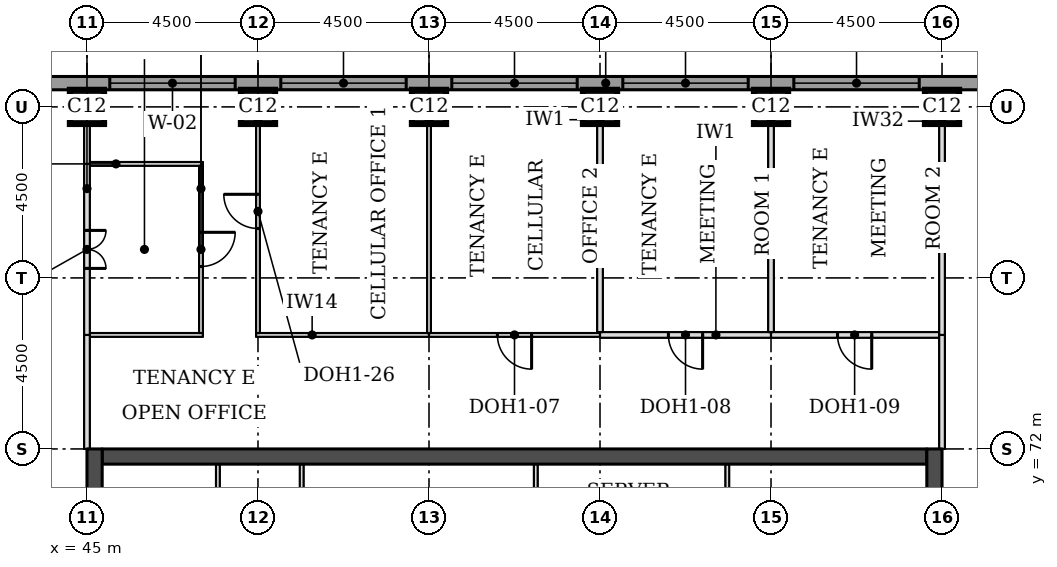
"""IFC4 building model, lengths in metres.
Left out: names, types, materials, properties, quantities, classifications, styles, units other than length and angle.
Written with IfcOpenShell. Run it as: python <this file> out.ifc"""

import sys

from ifc_helpers import new_model, si_unit, direction, frame, frame_2d, origin, origin_2d, place, context, subcontext, project, spatial, rectangle, extrude, element, fill, save


model = new_model("IFC4")
c1 = context("Model", 3, precision=1e-05, world=origin(), true_north=direction((0.0, 1.0)))
c2 = subcontext(c1, "Body", "Model", "MODEL_VIEW")
j1 = project(units=[si_unit("LENGTHUNIT", "METRE"), si_unit("PLANEANGLEUNIT", "RADIAN")], contexts=[c1])
p1 = place(None, origin())
s1 = spatial("IfcSite", under=j1, at=p1, CompositionType="ELEMENT")
p2 = place(p1, origin())
s2 = spatial("IfcBuilding", under=s1, at=p2, CompositionType="ELEMENT")
p3 = place(p2, frame((0.0, 0.0, 147.7)))
s3 = spatial("IfcBuildingStorey", under=s2, at=p3, CompositionType="ELEMENT", Elevation=147.7)
for number, where, z_axis, x_axis in (
    (1, (45.0, 81.0, 0.0), (0.0, 0.0, 1.0), (1.0, 0.0, 0.0)),
    (2, (49.5, 81.0, 0.0), (0.0, 0.0, 1.0), (1.0, 0.0, 0.0)),
    (3, (54.0, 81.0, 0.0), (0.0, 0.0, 1.0), (1.0, 0.0, 0.0)),
    (4, (58.5, 81.0, 0.0), (0.0, 0.0, 1.0), (1.0, 0.0, 0.0)),
    (5, (63.0, 81.0, 0.0), (0.0, 0.0, 1.0), (1.0, 0.0, 0.0)),
    (6, (67.5, 81.0, 0.0), (0.0, 0.0, 1.0), (1.0, 0.0, 0.0)),
):
    element("IfcColumn", number, at=place(p3, frame(where, z_axis=z_axis, x_axis=x_axis)), inside=s3, PredefinedType="COLUMN", context=c2, shape_type="SweptSolid", body=[
        extrude(rectangle(XDim=0.9, YDim=0.9, at=origin_2d()), origin(), (0.0, 0.0, 1.0), 3.7),
    ])
p4 = place(p3, frame((45.4, 71.8, 0.0), z_axis=(0.0, 0.0, 1.0), x_axis=(1.0, 0.0, 0.0)))
e7 = element("IfcWall", 7, at=p4, inside=s3, PredefinedType="SHEAR", context=c2, shape_type="SweptSolid", body=[
    extrude(rectangle(XDim=21.7, YDim=0.4, at=frame_2d((10.85, 0.0))), origin(), (0.0, 0.0, 1.0), 3.7),
])
p5 = place(p3, frame((45.2, 49.5, 0.0), z_axis=(0.0, 0.0, 1.0), x_axis=(0.0, 1.0, 0.0)))
e8 = element("IfcWall", 8, at=p5, inside=s3, PredefinedType="SHEAR", context=c2, shape_type="SweptSolid", body=[
    extrude(rectangle(XDim=22.5, YDim=0.4, at=frame_2d((11.25, 0.0))), origin(), (0.0, 0.0, 1.0), 3.7),
])
p6 = place(p5, frame((4.2, 0.0, 0.0)))
e9 = element("IfcOpeningElement", 9, at=p6, cuts=e8, PredefinedType="OPENING", context=c2, shape_type="SweptSolid", body=[
    extrude(rectangle(XDim=1.8, YDim=2.1, at=frame_2d((0.9, 1.05))), frame((0.0, 0.21, 0.0), z_axis=(0.0, -1.0, 0.0), x_axis=(1.0, 0.0, 0.0)), (0.0, 0.0, 1.0), 0.42),
])
p7 = place(p5, frame((6.9, 0.0, 0.0)))
e10 = element("IfcOpeningElement", 10, at=p7, cuts=e8, PredefinedType="OPENING", context=c2, shape_type="SweptSolid", body=[
    extrude(rectangle(XDim=1.1, YDim=2.1, at=frame_2d((0.55, 1.05))), frame((0.0, 0.21, 0.0), z_axis=(0.0, -1.0, 0.0), x_axis=(1.0, 0.0, 0.0)), (0.0, 0.0, 1.0), 0.42),
])
p8 = place(p5, frame((13.6, 0.0, 0.0)))
e11 = element("IfcOpeningElement", 11, at=p8, cuts=e8, PredefinedType="OPENING", context=c2, shape_type="SweptSolid", body=[
    extrude(rectangle(XDim=1.1, YDim=2.1, at=frame_2d((0.55, 1.05))), frame((0.0, 0.21, 0.0), z_axis=(0.0, -1.0, 0.0), x_axis=(1.0, 0.0, 0.0)), (0.0, 0.0, 1.0), 0.42),
])
p9 = place(p5, frame((16.5, 0.0, 0.0)))
e12 = element("IfcOpeningElement", 12, at=p9, cuts=e8, PredefinedType="OPENING", context=c2, shape_type="SweptSolid", body=[
    extrude(rectangle(XDim=1.8, YDim=2.1, at=frame_2d((0.9, 1.05))), frame((0.0, 0.21, 0.0), z_axis=(0.0, -1.0, 0.0), x_axis=(1.0, 0.0, 0.0)), (0.0, 0.0, 1.0), 0.42),
])
p10 = place(p3, frame((67.3, 49.5, 0.0), z_axis=(0.0, 0.0, 1.0), x_axis=(0.0, 1.0, 0.0)))
e13 = element("IfcWall", 13, at=p10, inside=s3, PredefinedType="SHEAR", context=c2, shape_type="SweptSolid", body=[
    extrude(rectangle(XDim=22.5, YDim=0.4, at=frame_2d((11.25, 0.0))), origin(), (0.0, 0.0, 1.0), 3.7),
])
p11 = place(p10, frame((4.2, 0.0, 0.0)))
e14 = element("IfcOpeningElement", 14, at=p11, cuts=e13, PredefinedType="OPENING", context=c2, shape_type="SweptSolid", body=[
    extrude(rectangle(XDim=1.8, YDim=2.1, at=frame_2d((0.9, 1.05))), frame((0.0, 0.21, 0.0), z_axis=(0.0, -1.0, 0.0), x_axis=(1.0, 0.0, 0.0)), (0.0, 0.0, 1.0), 0.42),
])
p12 = place(p10, frame((6.9, 0.0, 0.0)))
e15 = element("IfcOpeningElement", 15, at=p12, cuts=e13, PredefinedType="OPENING", context=c2, shape_type="SweptSolid", body=[
    extrude(rectangle(XDim=1.1, YDim=2.1, at=frame_2d((0.55, 1.05))), frame((0.0, 0.21, 0.0), z_axis=(0.0, -1.0, 0.0), x_axis=(1.0, 0.0, 0.0)), (0.0, 0.0, 1.0), 0.42),
])
p13 = place(p10, frame((13.6, 0.0, 0.0)))
e16 = element("IfcOpeningElement", 16, at=p13, cuts=e13, PredefinedType="OPENING", context=c2, shape_type="SweptSolid", body=[
    extrude(rectangle(XDim=1.1, YDim=2.1, at=frame_2d((0.55, 1.05))), frame((0.0, 0.21, 0.0), z_axis=(0.0, -1.0, 0.0), x_axis=(1.0, 0.0, 0.0)), (0.0, 0.0, 1.0), 0.42),
])
p14 = place(p10, frame((16.5, 0.0, 0.0)))
e17 = element("IfcOpeningElement", 17, at=p14, cuts=e13, PredefinedType="OPENING", context=c2, shape_type="SweptSolid", body=[
    extrude(rectangle(XDim=1.8, YDim=2.1, at=frame_2d((0.9, 1.05))), frame((0.0, 0.21, 0.0), z_axis=(0.0, -1.0, 0.0), x_axis=(1.0, 0.0, 0.0)), (0.0, 0.0, 1.0), 0.42),
])
p15 = place(p3, frame((72.331, 81.625, 0.0), z_axis=(0.0, 0.0, 1.0), x_axis=(-1.0, 0.0, 0.0)))
e18 = element("IfcWall", 18, at=p15, inside=s3, PredefinedType="STANDARD", context=c2, shape_type="SweptSolid", body=[
    extrude(rectangle(XDim=32.163, YDim=0.35, at=frame_2d((16.081, 0.0))), origin(), (0.0, 0.0, 1.0), 3.525),
])
p16 = place(p15, frame((5.431, 0.0, 0.9)))
e19 = element("IfcOpeningElement", 19, at=p16, cuts=e18, PredefinedType="OPENING", context=c2, shape_type="SweptSolid", body=[
    extrude(rectangle(XDim=3.3, YDim=1.9, at=frame_2d((1.65, 0.95))), frame((0.0, 0.185, 0.0), z_axis=(0.0, -1.0, 0.0), x_axis=(1.0, 0.0, 0.0)), (0.0, 0.0, 1.0), 0.37),
])
p17 = place(p15, frame((9.931, 0.0, 0.9)))
e20 = element("IfcOpeningElement", 20, at=p17, cuts=e18, PredefinedType="OPENING", context=c2, shape_type="SweptSolid", body=[
    extrude(rectangle(XDim=3.3, YDim=1.9, at=frame_2d((1.65, 0.95))), frame((0.0, 0.185, 0.0), z_axis=(0.0, -1.0, 0.0), x_axis=(1.0, 0.0, 0.0)), (0.0, 0.0, 1.0), 0.37),
])
p18 = place(p15, frame((14.431, 0.0, 0.9)))
e21 = element("IfcOpeningElement", 21, at=p18, cuts=e18, PredefinedType="OPENING", context=c2, shape_type="SweptSolid", body=[
    extrude(rectangle(XDim=3.3, YDim=1.9, at=frame_2d((1.65, 0.95))), frame((0.0, 0.185, 0.0), z_axis=(0.0, -1.0, 0.0), x_axis=(1.0, 0.0, 0.0)), (0.0, 0.0, 1.0), 0.37),
])
p19 = place(p15, frame((18.931, 0.0, 0.9)))
e22 = element("IfcOpeningElement", 22, at=p19, cuts=e18, PredefinedType="OPENING", context=c2, shape_type="SweptSolid", body=[
    extrude(rectangle(XDim=3.3, YDim=1.9, at=frame_2d((1.65, 0.95))), frame((0.0, 0.185, 0.0), z_axis=(0.0, -1.0, 0.0), x_axis=(1.0, 0.0, 0.0)), (0.0, 0.0, 1.0), 0.37),
])
p20 = place(p15, frame((23.431, 0.0, 0.9)))
e23 = element("IfcOpeningElement", 23, at=p20, cuts=e18, PredefinedType="OPENING", context=c2, shape_type="SweptSolid", body=[
    extrude(rectangle(XDim=3.3, YDim=1.9, at=frame_2d((1.65, 0.95))), frame((0.0, 0.185, 0.0), z_axis=(0.0, -1.0, 0.0), x_axis=(1.0, 0.0, 0.0)), (0.0, 0.0, 1.0), 0.37),
])
p21 = place(p3, frame((45.075, 75.0, 0.0), z_axis=(0.0, 0.0, 1.0), x_axis=(1.0, 0.0, 0.0)))
e24 = element("IfcWall", 24, at=p21, inside=s3, PredefinedType="PARTITIONING", context=c2, shape_type="SweptSolid", body=[
    extrude(rectangle(XDim=2.975, YDim=0.1, at=frame_2d((1.488, 0.0))), origin(), (0.0, 0.0, 1.0), 3.55),
])
p22 = place(p3, frame((49.45, 75.0, 0.0), z_axis=(0.0, 0.0, 1.0), x_axis=(1.0, 0.0, 0.0)))
e25 = element("IfcWall", 25, at=p22, inside=s3, PredefinedType="PARTITIONING", context=c2, shape_type="SweptSolid", body=[
    extrude(rectangle(XDim=4.55, YDim=0.1, at=frame_2d((2.275, 0.0))), origin(), (0.0, 0.0, 1.0), 3.55),
])
p23 = place(p3, frame((54.0, 75.0, 0.0), z_axis=(0.0, 0.0, 1.0), x_axis=(1.0, 0.0, 0.0)))
e26 = element("IfcWall", 26, at=p23, inside=s3, PredefinedType="PARTITIONING", context=c2, shape_type="SweptSolid", body=[
    extrude(rectangle(XDim=4.5, YDim=0.1, at=frame_2d((2.25, 0.0))), origin(), (0.0, 0.0, 1.0), 3.55),
])
p24 = place(p23, frame((1.8, 0.0, 0.0)))
e27 = element("IfcOpeningElement", 27, at=p24, cuts=e26, PredefinedType="OPENING", context=c2, shape_type="SweptSolid", body=[
    extrude(rectangle(XDim=0.9, YDim=2.1, at=frame_2d((0.45, 1.05))), frame((0.0, 0.06, 0.0), z_axis=(0.0, -1.0, 0.0), x_axis=(1.0, 0.0, 0.0)), (0.0, 0.0, 1.0), 0.12),
])
p25 = place(p3, frame((58.5, 75.0, 0.0), z_axis=(0.0, 0.0, 1.0), x_axis=(1.0, 0.0, 0.0)))
e28 = element("IfcWall", 28, at=p25, inside=s3, PredefinedType="PARTITIONING", context=c2, shape_type="SweptSolid", body=[
    extrude(rectangle(XDim=4.5, YDim=0.15, at=frame_2d((2.25, 0.0))), origin(), (0.0, 0.0, 1.0), 3.55),
])
p26 = place(p25, frame((1.8, 0.0, 0.0)))
e29 = element("IfcOpeningElement", 29, at=p26, cuts=e28, PredefinedType="OPENING", context=c2, shape_type="SweptSolid", body=[
    extrude(rectangle(XDim=0.9, YDim=2.1, at=frame_2d((0.45, 1.05))), frame((0.0, 0.085, 0.0), z_axis=(0.0, -1.0, 0.0), x_axis=(1.0, 0.0, 0.0)), (0.0, 0.0, 1.0), 0.17),
])
p27 = place(p3, frame((63.0, 75.0, 0.0), z_axis=(0.0, 0.0, 1.0), x_axis=(1.0, 0.0, 0.0)))
e30 = element("IfcWall", 30, at=p27, inside=s3, PredefinedType="PARTITIONING", context=c2, shape_type="SweptSolid", body=[
    extrude(rectangle(XDim=4.425, YDim=0.15, at=frame_2d((2.212, 0.0))), origin(), (0.0, 0.0, 1.0), 3.55),
])
p28 = place(p27, frame((1.75, 0.0, 0.0)))
e31 = element("IfcOpeningElement", 31, at=p28, cuts=e30, PredefinedType="OPENING", context=c2, shape_type="SweptSolid", body=[
    extrude(rectangle(XDim=0.9, YDim=2.1, at=frame_2d((0.45, 1.05))), frame((0.0, 0.085, 0.0), z_axis=(0.0, -1.0, 0.0), x_axis=(1.0, 0.0, 0.0)), (0.0, 0.0, 1.0), 0.17),
])
p29 = place(p3, frame((45.075, 79.5, 0.0), z_axis=(0.0, 0.0, 1.0), x_axis=(1.0, 0.0, 0.0)))
e32 = element("IfcWall", 32, at=p29, inside=s3, PredefinedType="PARTITIONING", context=c2, shape_type="SweptSolid", body=[
    extrude(rectangle(XDim=2.975, YDim=0.1, at=frame_2d((1.488, 0.0))), origin(), (0.0, 0.0, 1.0), 3.55),
])
for number, where, z_axis, x_axis in (
    (33, (45.0, 72.0, 0.0), (0.0, 0.0, 1.0), (0.0, 1.0, 0.0)),
    (34, (67.5, 72.0, 0.0), (0.0, 0.0, 1.0), (0.0, 1.0, 0.0)),
):
    element("IfcWall", number, at=place(p3, frame(where, z_axis=z_axis, x_axis=x_axis)), inside=s3, PredefinedType="PARTITIONING", context=c2, shape_type="SweptSolid", body=[
        extrude(rectangle(XDim=3.0, YDim=0.15, at=frame_2d((1.5, 0.0))), origin(), (0.0, 0.0, 1.0), 3.022),
    ])
p30 = place(p3, frame((45.0, 75.0, 0.0), z_axis=(0.0, 0.0, 1.0), x_axis=(0.0, 1.0, 0.0)))
e35 = element("IfcWall", 35, at=p30, inside=s3, PredefinedType="PARTITIONING", context=c2, shape_type="SweptSolid", body=[
    extrude(rectangle(XDim=4.5, YDim=0.15, at=frame_2d((2.25, 0.0))), origin(), (0.0, 0.0, 1.0), 3.022),
])
p31 = place(p30, frame((1.75, 0.0, 0.0)))
e36 = element("IfcOpeningElement", 36, at=p31, cuts=e35, PredefinedType="OPENING", context=c2, shape_type="SweptSolid", body=[
    extrude(rectangle(XDim=1.0, YDim=2.1, at=frame_2d((0.5, 1.05))), frame((0.0, 0.085, 0.0), z_axis=(0.0, -1.0, 0.0), x_axis=(1.0, 0.0, 0.0)), (0.0, 0.0, 1.0), 0.17),
])
p32 = place(p3, frame((67.5, 75.0, 0.0), z_axis=(0.0, 0.0, 1.0), x_axis=(0.0, 1.0, 0.0)))
e37 = element("IfcWall", 37, at=p32, inside=s3, PredefinedType="PARTITIONING", context=c2, shape_type="SweptSolid", body=[
    extrude(rectangle(XDim=6.45, YDim=0.15, at=frame_2d((3.225, 0.0))), origin(), (0.0, 0.0, 1.0), 3.022),
])
p33 = place(p3, frame((48.0, 75.05, 0.0), z_axis=(0.0, 0.0, 1.0), x_axis=(0.0, 1.0, 0.0)))
e38 = element("IfcWall", 38, at=p33, inside=s3, PredefinedType="PARTITIONING", context=c2, shape_type="SweptSolid", body=[
    extrude(rectangle(XDim=4.4, YDim=0.1, at=frame_2d((2.2, 0.0))), origin(), (0.0, 0.0, 1.0), 3.55),
])
p34 = place(p33, frame((1.75, 0.0, 0.0)))
e39 = element("IfcOpeningElement", 39, at=p34, cuts=e38, PredefinedType="OPENING", context=c2, shape_type="SweptSolid", body=[
    extrude(rectangle(XDim=0.9, YDim=2.1, at=frame_2d((0.45, 1.05))), frame((0.0, 0.06, 0.0), z_axis=(0.0, -1.0, 0.0), x_axis=(1.0, 0.0, 0.0)), (0.0, 0.0, 1.0), 0.12),
])
p35 = place(p3, frame((49.5, 75.05, 0.0), z_axis=(0.0, 0.0, 1.0), x_axis=(0.0, 1.0, 0.0)))
e40 = element("IfcWall", 40, at=p35, inside=s3, PredefinedType="PARTITIONING", context=c2, shape_type="SweptSolid", body=[
    extrude(rectangle(XDim=6.4, YDim=0.1, at=frame_2d((3.2, 0.0))), origin(), (0.0, 0.0, 1.0), 3.55),
])
p36 = place(p35, frame((2.75, 0.0, 0.0)))
e41 = element("IfcOpeningElement", 41, at=p36, cuts=e40, PredefinedType="OPENING", context=c2, shape_type="SweptSolid", body=[
    extrude(rectangle(XDim=0.9, YDim=2.1, at=frame_2d((0.45, 1.05))), frame((0.0, 0.06, 0.0), z_axis=(0.0, -1.0, 0.0), x_axis=(1.0, 0.0, 0.0)), (0.0, 0.0, 1.0), 0.12),
])
p37 = place(p3, frame((54.0, 75.05, 0.0), z_axis=(0.0, 0.0, 1.0), x_axis=(0.0, 1.0, 0.0)))
e42 = element("IfcWall", 42, at=p37, inside=s3, PredefinedType="PARTITIONING", context=c2, shape_type="SweptSolid", body=[
    extrude(rectangle(XDim=6.4, YDim=0.1, at=frame_2d((3.2, 0.0))), origin(), (0.0, 0.0, 1.0), 3.55),
])
for number, where, z_axis, x_axis in (
    (43, (58.5, 75.075, 0.0), (0.0, 0.0, 1.0), (0.0, 1.0, 0.0)),
    (44, (63.0, 75.075, 0.0), (0.0, 0.0, 1.0), (0.0, 1.0, 0.0)),
):
    element("IfcWall", number, at=place(p3, frame(where, z_axis=z_axis, x_axis=x_axis)), inside=s3, PredefinedType="PARTITIONING", context=c2, shape_type="SweptSolid", body=[
        extrude(rectangle(XDim=6.375, YDim=0.15, at=frame_2d((3.188, 0.0))), origin(), (0.0, 0.0, 1.0), 3.55),
    ])
p38 = place(p3, frame((45.0, 79.5, 0.0), z_axis=(0.0, 0.0, 1.0), x_axis=(0.0, 1.0, 0.0)))
e45 = element("IfcWall", 45, at=p38, inside=s3, PredefinedType="PARTITIONING", context=c2, shape_type="SweptSolid", body=[
    extrude(rectangle(XDim=1.95, YDim=0.15, at=frame_2d((0.975, 0.0))), origin(), (0.0, 0.0, 1.0), 3.022),
])
for number, where, z_axis, x_axis in (
    (46, (48.445, 68.5, 0.0), (0.0, 0.0, 1.0), (0.0, 1.0, 0.0)),
    (47, (50.65, 68.5, 0.0), (0.0, 0.0, 1.0), (0.0, 1.0, 0.0)),
    (48, (56.81, 68.5, 0.0), (0.0, 0.0, 1.0), (0.0, 1.0, 0.0)),
    (49, (61.85, 68.5, 0.0), (0.0, 0.0, 1.0), (0.0, 1.0, 0.0)),
):
    element("IfcWall", number, at=place(p3, frame(where, z_axis=z_axis, x_axis=x_axis)), inside=s3, PredefinedType="PARTITIONING", context=c2, shape_type="SweptSolid", body=[
        extrude(rectangle(XDim=3.1, YDim=0.1, at=frame_2d((1.55, 0.0))), origin(), (0.0, 0.0, 1.0), 3.55),
    ])
p39 = place(p16, origin())
e50 = element("IfcWindow", 50, at=p39, inside=s3, PartitioningType="SINGLE_PANEL", PredefinedType="WINDOW", context=c2, shape_type="SweptSolid", body=[
    extrude(rectangle(XDim=3.3, YDim=1.9, at=frame_2d((1.65, 0.95))), frame((0.0, 0.085, 0.0), z_axis=(0.0, -1.0, 0.0), x_axis=(1.0, 0.0, 0.0)), (0.0, 0.0, 1.0), 0.06),
])
fill(e19, e50)
p40 = place(p17, origin())
e51 = element("IfcWindow", 51, at=p40, inside=s3, PartitioningType="SINGLE_PANEL", PredefinedType="WINDOW", context=c2, shape_type="SweptSolid", body=[
    extrude(rectangle(XDim=3.3, YDim=1.9, at=frame_2d((1.65, 0.95))), frame((0.0, 0.085, 0.0), z_axis=(0.0, -1.0, 0.0), x_axis=(1.0, 0.0, 0.0)), (0.0, 0.0, 1.0), 0.06),
])
fill(e20, e51)
p41 = place(p18, origin())
e52 = element("IfcWindow", 52, at=p41, inside=s3, PartitioningType="SINGLE_PANEL", PredefinedType="WINDOW", context=c2, shape_type="SweptSolid", body=[
    extrude(rectangle(XDim=3.3, YDim=1.9, at=frame_2d((1.65, 0.95))), frame((0.0, 0.085, 0.0), z_axis=(0.0, -1.0, 0.0), x_axis=(1.0, 0.0, 0.0)), (0.0, 0.0, 1.0), 0.06),
])
fill(e21, e52)
p42 = place(p19, origin())
e53 = element("IfcWindow", 53, at=p42, inside=s3, PartitioningType="SINGLE_PANEL", PredefinedType="WINDOW", context=c2, shape_type="SweptSolid", body=[
    extrude(rectangle(XDim=3.3, YDim=1.9, at=frame_2d((1.65, 0.95))), frame((0.0, 0.085, 0.0), z_axis=(0.0, -1.0, 0.0), x_axis=(1.0, 0.0, 0.0)), (0.0, 0.0, 1.0), 0.06),
])
fill(e22, e53)
p43 = place(p20, origin())
e54 = element("IfcWindow", 54, at=p43, inside=s3, PartitioningType="SINGLE_PANEL", PredefinedType="WINDOW", context=c2, shape_type="SweptSolid", body=[
    extrude(rectangle(XDim=3.3, YDim=1.9, at=frame_2d((1.65, 0.95))), frame((0.0, 0.085, 0.0), z_axis=(0.0, -1.0, 0.0), x_axis=(1.0, 0.0, 0.0)), (0.0, 0.0, 1.0), 0.06),
])
fill(e23, e54)
p44 = place(p31, frame((1.0, 0.0, 0.0), z_axis=(0.0, 0.0, 1.0), x_axis=(-1.0, 0.0, 0.0)))
e55 = element("IfcDoor", 55, at=p44, inside=s3, OperationType="DOUBLE_DOOR_SINGLE_SWING", PredefinedType="DOOR", context=c2, shape_type="SweptSolid", body=[
    extrude(rectangle(XDim=1.0, YDim=2.1, at=frame_2d((0.5, 1.05))), frame((0.0, 0.025, 0.0), z_axis=(0.0, -1.0, 0.0), x_axis=(1.0, 0.0, 0.0)), (0.0, 0.0, 1.0), 0.05),
])
fill(e36, e55)
p45 = place(p34, frame((0.9, 0.0, 0.0), z_axis=(0.0, 0.0, 1.0), x_axis=(-1.0, 0.0, 0.0)))
e56 = element("IfcDoor", 56, at=p45, inside=s3, OperationType="SINGLE_SWING_LEFT", PredefinedType="DOOR", context=c2, shape_type="SweptSolid", body=[
    extrude(rectangle(XDim=0.9, YDim=2.1, at=frame_2d((0.45, 1.05))), frame((0.0, 0.025, 0.0), z_axis=(0.0, -1.0, 0.0), x_axis=(1.0, 0.0, 0.0)), (0.0, 0.0, 1.0), 0.05),
])
fill(e39, e56)
p46 = place(p36, origin())
e57 = element("IfcDoor", 57, at=p46, inside=s3, OperationType="SINGLE_SWING_RIGHT", PredefinedType="DOOR", context=c2, shape_type="SweptSolid", body=[
    extrude(rectangle(XDim=0.9, YDim=2.1, at=frame_2d((0.45, 1.05))), frame((0.0, 0.025, 0.0), z_axis=(0.0, -1.0, 0.0), x_axis=(1.0, 0.0, 0.0)), (0.0, 0.0, 1.0), 0.05),
])
fill(e41, e57)
p47 = place(p24, frame((0.9, 0.0, 0.0), z_axis=(0.0, 0.0, 1.0), x_axis=(-1.0, 0.0, 0.0)))
e58 = element("IfcDoor", 58, at=p47, inside=s3, OperationType="SINGLE_SWING_LEFT", PredefinedType="DOOR", context=c2, shape_type="SweptSolid", body=[
    extrude(rectangle(XDim=0.9, YDim=2.1, at=frame_2d((0.45, 1.05))), frame((0.0, 0.025, 0.0), z_axis=(0.0, -1.0, 0.0), x_axis=(1.0, 0.0, 0.0)), (0.0, 0.0, 1.0), 0.05),
])
fill(e27, e58)
p48 = place(p26, frame((0.9, 0.0, 0.0), z_axis=(0.0, 0.0, 1.0), x_axis=(-1.0, 0.0, 0.0)))
e59 = element("IfcDoor", 59, at=p48, inside=s3, OperationType="SINGLE_SWING_LEFT", PredefinedType="DOOR", context=c2, shape_type="SweptSolid", body=[
    extrude(rectangle(XDim=0.9, YDim=2.1, at=frame_2d((0.45, 1.05))), frame((0.0, 0.025, 0.0), z_axis=(0.0, -1.0, 0.0), x_axis=(1.0, 0.0, 0.0)), (0.0, 0.0, 1.0), 0.05),
])
fill(e29, e59)
p49 = place(p28, frame((0.9, 0.0, 0.0), z_axis=(0.0, 0.0, 1.0), x_axis=(-1.0, 0.0, 0.0)))
e60 = element("IfcDoor", 60, at=p49, inside=s3, OperationType="SINGLE_SWING_LEFT", PredefinedType="DOOR", context=c2, shape_type="SweptSolid", body=[
    extrude(rectangle(XDim=0.9, YDim=2.1, at=frame_2d((0.45, 1.05))), frame((0.0, 0.025, 0.0), z_axis=(0.0, -1.0, 0.0), x_axis=(1.0, 0.0, 0.0)), (0.0, 0.0, 1.0), 0.05),
])
fill(e31, e60)
save(model, sys.argv[1])
